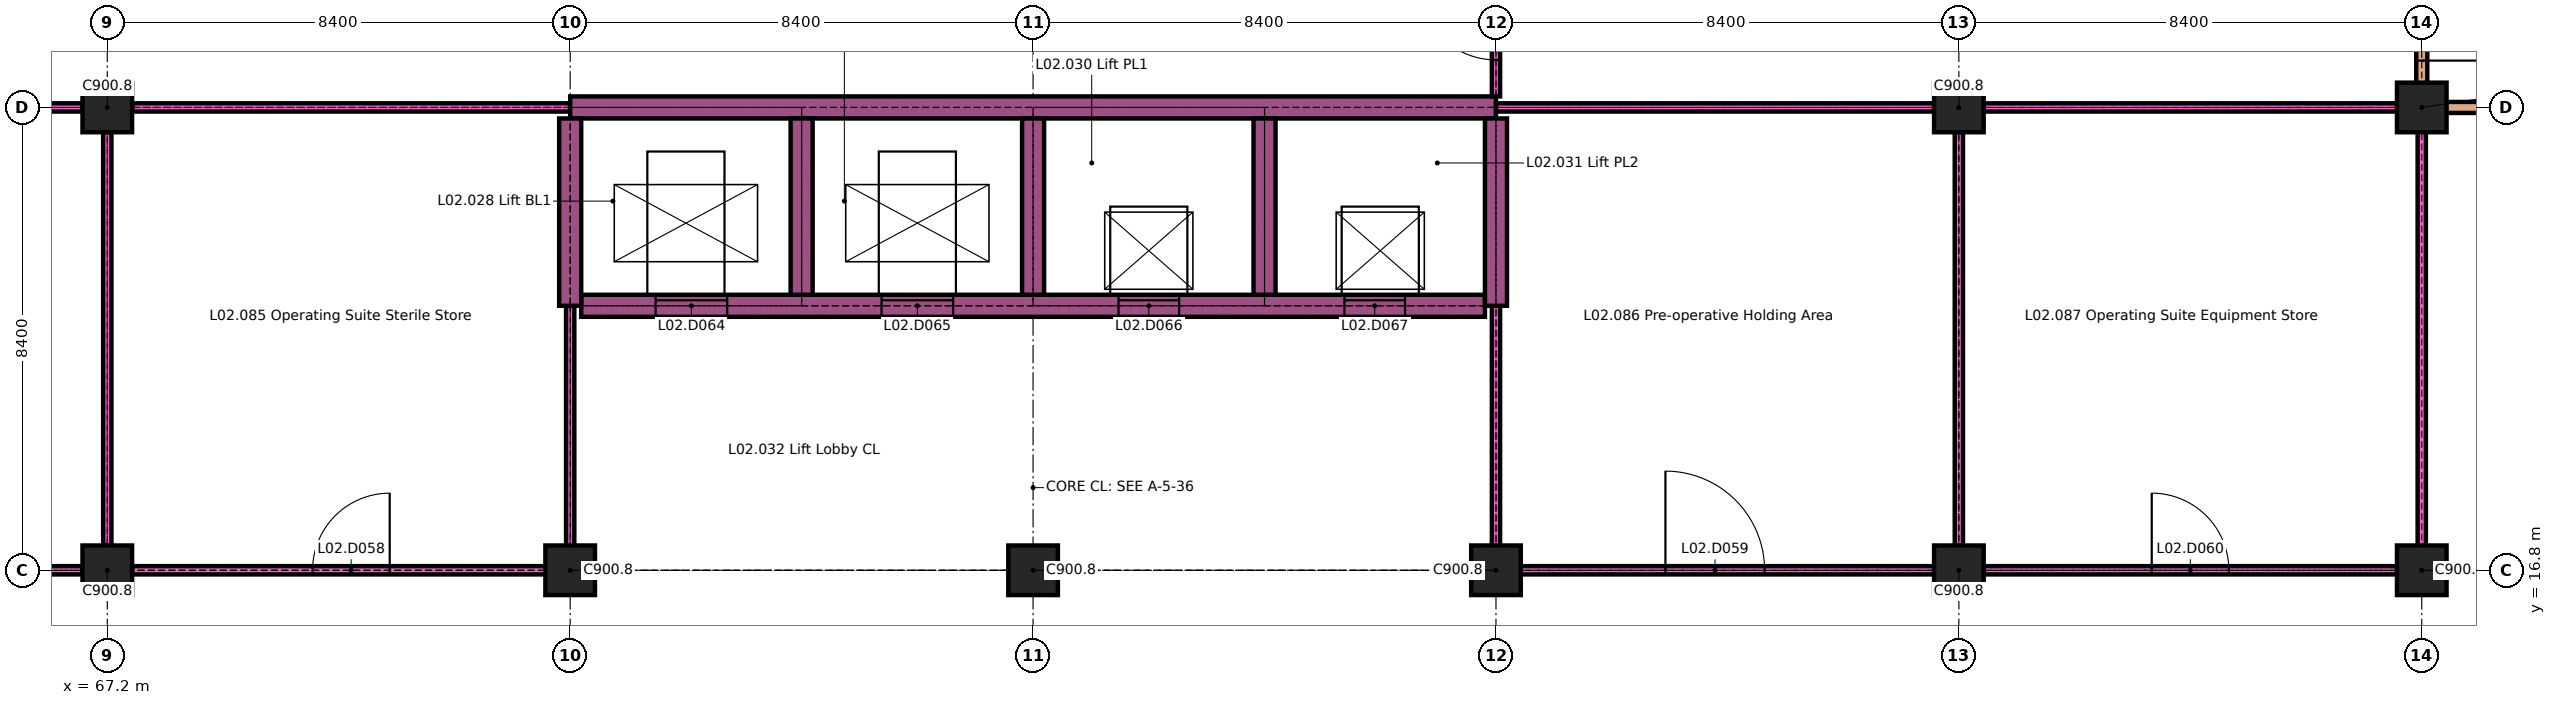
"""IFC4 building model, lengths in metres.
Left out: names, types, materials, properties, quantities, classifications, styles, units other than length and angle.
Written with IfcOpenShell. Run it as: python <this file> out.ifc"""

import sys

from ifc_helpers import new_model, si_unit, direction, frame, frame_2d, origin, origin_2d, place, context, subcontext, project, spatial, rectangle, extrude, element, fill, save


model = new_model("IFC4")
c1 = context("Model", 3, precision=1e-05, world=origin(), true_north=direction((0.0, 1.0)))
c2 = subcontext(c1, "Body", "Model", "MODEL_VIEW")
j1 = project(units=[si_unit("LENGTHUNIT", "METRE"), si_unit("PLANEANGLEUNIT", "RADIAN")], contexts=[c1])
p1 = place(None, origin())
s1 = spatial("IfcSite", under=j1, at=p1, CompositionType="ELEMENT")
p2 = place(p1, origin())
s2 = spatial("IfcBuilding", under=s1, at=p2, CompositionType="ELEMENT")
p3 = place(p2, frame((0.0, 0.0, 8.4)))
s3 = spatial("IfcBuildingStorey", under=s2, at=p3, CompositionType="ELEMENT", Elevation=8.4)
for number, where, z_axis, x_axis in (
    (1, (67.2, 16.8, 0.0), (0.0, 0.0, 1.0), (1.0, 0.0, 0.0)),
    (2, (100.8, 16.8, 0.0), (0.0, 0.0, 1.0), (1.0, 0.0, 0.0)),
    (3, (109.2, 16.8, 0.0), (0.0, 0.0, 1.0), (1.0, 0.0, 0.0)),
    (4, (67.2, 25.2, 0.0), (0.0, 0.0, 1.0), (1.0, 0.0, 0.0)),
    (5, (100.8, 25.2, 0.0), (0.0, 0.0, 1.0), (1.0, 0.0, 0.0)),
):
    element("IfcColumn", number, at=place(p3, frame(where, z_axis=z_axis, x_axis=x_axis)), inside=s3, PredefinedType="COLUMN", context=c2, shape_type="SweptSolid", body=[
        extrude(rectangle(XDim=0.9, YDim=0.9, at=origin_2d()), origin(), (0.0, 0.0, 1.0), 4.2),
    ])
p4 = place(p3, frame((59.25, 16.8, 0.0), z_axis=(0.0, 0.0, 1.0), x_axis=(1.0, 0.0, 0.0)))
e6 = element("IfcWall", 6, at=p4, inside=s3, PredefinedType="PARTITIONING", context=c2, shape_type="SweptSolid", body=[
    extrude(rectangle(XDim=7.5, YDim=0.15, at=frame_2d((3.75, 0.0))), origin(), (0.0, 0.0, 1.0), 4.2),
])
p5 = place(p4, frame((2.85, 0.0, 0.0)))
e7 = element("IfcOpeningElement", 7, at=p5, cuts=e6, PredefinedType="OPENING", context=c2, shape_type="SweptSolid", body=[
    extrude(rectangle(XDim=1.8, YDim=2.4, at=frame_2d((0.9, 1.2))), frame((0.0, 0.085, 0.0), z_axis=(0.0, -1.0, 0.0), x_axis=(1.0, 0.0, 0.0)), (0.0, 0.0, 1.0), 0.17),
])
p6 = place(p3, frame((67.65, 16.8, 0.0), z_axis=(0.0, 0.0, 1.0), x_axis=(1.0, 0.0, 0.0)))
e8 = element("IfcWall", 8, at=p6, inside=s3, PredefinedType="PARTITIONING", context=c2, shape_type="SweptSolid", body=[
    extrude(rectangle(XDim=8.025, YDim=0.15, at=frame_2d((4.013, 0.0))), origin(), (0.0, 0.0, 1.0), 4.2),
])
p7 = place(p6, frame((3.275, 0.0, 0.0)))
e9 = element("IfcOpeningElement", 9, at=p7, cuts=e8, PredefinedType="OPENING", context=c2, shape_type="SweptSolid", body=[
    extrude(rectangle(XDim=1.4, YDim=2.1, at=frame_2d((0.7, 1.05))), frame((0.0, 0.085, 0.0), z_axis=(0.0, -1.0, 0.0), x_axis=(1.0, 0.0, 0.0)), (0.0, 0.0, 1.0), 0.17),
])
p8 = place(p3, frame((92.325, 16.8, 0.0), z_axis=(0.0, 0.0, 1.0), x_axis=(1.0, 0.0, 0.0)))
e10 = element("IfcWall", 10, at=p8, inside=s3, PredefinedType="PARTITIONING", context=c2, shape_type="SweptSolid", body=[
    extrude(rectangle(XDim=8.025, YDim=0.15, at=frame_2d((4.013, 0.0))), origin(), (0.0, 0.0, 1.0), 4.2),
])
p9 = place(p8, frame((3.15, 0.0, 0.0)))
e11 = element("IfcOpeningElement", 11, at=p9, cuts=e10, PredefinedType="OPENING", context=c2, shape_type="SweptSolid", body=[
    extrude(rectangle(XDim=1.8, YDim=2.4, at=frame_2d((0.9, 1.2))), frame((0.0, 0.085, 0.0), z_axis=(0.0, -1.0, 0.0), x_axis=(1.0, 0.0, 0.0)), (0.0, 0.0, 1.0), 0.17),
])
p10 = place(p3, frame((101.25, 16.8, 0.0), z_axis=(0.0, 0.0, 1.0), x_axis=(1.0, 0.0, 0.0)))
e12 = element("IfcWall", 12, at=p10, inside=s3, PredefinedType="PARTITIONING", context=c2, shape_type="SweptSolid", body=[
    extrude(rectangle(XDim=7.5, YDim=0.15, at=frame_2d((3.75, 0.0))), origin(), (0.0, 0.0, 1.0), 4.2),
])
p11 = place(p10, frame((3.05, 0.0, 0.0)))
e13 = element("IfcOpeningElement", 13, at=p11, cuts=e12, PredefinedType="OPENING", context=c2, shape_type="SweptSolid", body=[
    extrude(rectangle(XDim=1.4, YDim=2.1, at=frame_2d((0.7, 1.05))), frame((0.0, 0.085, 0.0), z_axis=(0.0, -1.0, 0.0), x_axis=(1.0, 0.0, 0.0)), (0.0, 0.0, 1.0), 0.17),
])
p12 = place(p3, frame((75.8, 21.6, 0.0), z_axis=(0.0, 0.0, 1.0), x_axis=(1.0, 0.0, 0.0)))
e14 = element("IfcWall", 14, at=p12, inside=s3, PredefinedType="SHEAR", context=c2, shape_type="SweptSolid", body=[
    extrude(rectangle(XDim=16.4, YDim=0.4, at=frame_2d((8.2, 0.0))), origin(), (0.0, 0.0, 1.0), 4.2),
])
p13 = place(p12, frame((1.35, 0.0, 0.0)))
e15 = element("IfcOpeningElement", 15, at=p13, cuts=e14, PredefinedType="OPENING", context=c2, shape_type="SweptSolid", body=[
    extrude(rectangle(XDim=1.3, YDim=2.1, at=frame_2d((0.65, 1.05))), frame((0.0, 0.21, 0.0), z_axis=(0.0, -1.0, 0.0), x_axis=(1.0, 0.0, 0.0)), (0.0, 0.0, 1.0), 0.42),
])
p14 = place(p12, frame((5.45, 0.0, 0.0)))
e16 = element("IfcOpeningElement", 16, at=p14, cuts=e14, PredefinedType="OPENING", context=c2, shape_type="SweptSolid", body=[
    extrude(rectangle(XDim=1.3, YDim=2.1, at=frame_2d((0.65, 1.05))), frame((0.0, 0.21, 0.0), z_axis=(0.0, -1.0, 0.0), x_axis=(1.0, 0.0, 0.0)), (0.0, 0.0, 1.0), 0.42),
])
p15 = place(p12, frame((9.75, 0.0, 0.0)))
e17 = element("IfcOpeningElement", 17, at=p15, cuts=e14, PredefinedType="OPENING", context=c2, shape_type="SweptSolid", body=[
    extrude(rectangle(XDim=1.1, YDim=2.1, at=frame_2d((0.55, 1.05))), frame((0.0, 0.21, 0.0), z_axis=(0.0, -1.0, 0.0), x_axis=(1.0, 0.0, 0.0)), (0.0, 0.0, 1.0), 0.42),
])
p16 = place(p12, frame((13.85, 0.0, 0.0)))
e18 = element("IfcOpeningElement", 18, at=p16, cuts=e14, PredefinedType="OPENING", context=c2, shape_type="SweptSolid", body=[
    extrude(rectangle(XDim=1.1, YDim=2.1, at=frame_2d((0.55, 1.05))), frame((0.0, 0.21, 0.0), z_axis=(0.0, -1.0, 0.0), x_axis=(1.0, 0.0, 0.0)), (0.0, 0.0, 1.0), 0.42),
])
p17 = place(p3, frame((59.25, 25.2, 0.0), z_axis=(0.0, 0.0, 1.0), x_axis=(1.0, 0.0, 0.0)))
e19 = element("IfcWall", 19, at=p17, inside=s3, PredefinedType="PARTITIONING", context=c2, shape_type="SweptSolid", body=[
    extrude(rectangle(XDim=7.5, YDim=0.15, at=frame_2d((3.75, 0.0))), origin(), (0.0, 0.0, 1.0), 4.2),
])
p18 = place(p3, frame((67.65, 25.2, 0.0), z_axis=(0.0, 0.0, 1.0), x_axis=(1.0, 0.0, 0.0)))
e20 = element("IfcWall", 20, at=p18, inside=s3, PredefinedType="PARTITIONING", context=c2, shape_type="SweptSolid", body=[
    extrude(rectangle(XDim=7.95, YDim=0.15, at=frame_2d((3.975, 0.0))), origin(), (0.0, 0.0, 1.0), 4.2),
])
p19 = place(p3, frame((75.6, 25.2, 0.0), z_axis=(0.0, 0.0, 1.0), x_axis=(1.0, 0.0, 0.0)))
e21 = element("IfcWall", 21, at=p19, inside=s3, PredefinedType="SHEAR", context=c2, shape_type="SweptSolid", body=[
    extrude(rectangle(XDim=16.8, YDim=0.4, at=frame_2d((8.4, 0.0))), origin(), (0.0, 0.0, 1.0), 4.2),
])
p20 = place(p3, frame((92.4, 25.2, 0.0), z_axis=(0.0, 0.0, 1.0), x_axis=(1.0, 0.0, 0.0)))
e22 = element("IfcWall", 22, at=p20, inside=s3, PredefinedType="PARTITIONING", context=c2, shape_type="SweptSolid", body=[
    extrude(rectangle(XDim=7.95, YDim=0.15, at=frame_2d((3.975, 0.0))), origin(), (0.0, 0.0, 1.0), 4.2),
])
p21 = place(p3, frame((101.25, 25.2, 0.0), z_axis=(0.0, 0.0, 1.0), x_axis=(1.0, 0.0, 0.0)))
e23 = element("IfcWall", 23, at=p21, inside=s3, PredefinedType="PARTITIONING", context=c2, shape_type="SweptSolid", body=[
    extrude(rectangle(XDim=7.95, YDim=0.15, at=frame_2d((3.975, 0.0))), origin(), (0.0, 0.0, 1.0), 4.2),
])
p22 = place(p3, frame((109.2, 25.2, 0.0), z_axis=(0.0, 0.0, 1.0), x_axis=(1.0, 0.0, 0.0)))
e24 = element("IfcWall", 24, at=p22, inside=s3, PredefinedType="PARTITIONING", context=c2, shape_type="SweptSolid", body=[
    extrude(rectangle(XDim=8.4, YDim=0.2, at=frame_2d((4.2, 0.0))), origin(), (0.0, 0.0, 1.0), 4.2),
])
p23 = place(p22, frame((3.5, 0.0, 0.0)))
e25 = element("IfcOpeningElement", 25, at=p23, cuts=e24, PredefinedType="OPENING", context=c2, shape_type="SweptSolid", body=[
    extrude(rectangle(XDim=1.4, YDim=2.1, at=frame_2d((0.7, 1.05))), frame((0.0, 0.11, 0.0), z_axis=(0.0, -1.0, 0.0), x_axis=(1.0, 0.0, 0.0)), (0.0, 0.0, 1.0), 0.22),
])
p24 = place(p3, frame((67.2, 17.25, 0.0), z_axis=(0.0, 0.0, 1.0), x_axis=(0.0, 1.0, 0.0)))
e26 = element("IfcWall", 26, at=p24, inside=s3, PredefinedType="PARTITIONING", context=c2, shape_type="SweptSolid", body=[
    extrude(rectangle(XDim=7.5, YDim=0.15, at=frame_2d((3.75, 0.0))), origin(), (0.0, 0.0, 1.0), 4.2),
])
p25 = place(p3, frame((75.6, 16.875, 0.0), z_axis=(0.0, 0.0, 1.0), x_axis=(0.0, 1.0, 0.0)))
e27 = element("IfcWall", 27, at=p25, inside=s3, PredefinedType="PARTITIONING", context=c2, shape_type="SweptSolid", body=[
    extrude(rectangle(XDim=4.725, YDim=0.15, at=frame_2d((2.363, 0.0))), origin(), (0.0, 0.0, 1.0), 4.2),
])
p26 = place(p3, frame((75.6, 21.6, 0.0), z_axis=(0.0, 0.0, 1.0), x_axis=(0.0, 1.0, 0.0)))
e28 = element("IfcWall", 28, at=p26, inside=s3, PredefinedType="SHEAR", context=c2, shape_type="SweptSolid", body=[
    extrude(rectangle(XDim=3.4, YDim=0.4, at=frame_2d((1.7, 0.0))), origin(), (0.0, 0.0, 1.0), 4.2),
])
for number, where, z_axis, x_axis in (
    (29, (79.8, 21.8, 0.0), (0.0, 0.0, 1.0), (0.0, 1.0, 0.0)),
    (30, (84.0, 21.8, 0.0), (0.0, 0.0, 1.0), (0.0, 1.0, 0.0)),
    (31, (88.2, 21.8, 0.0), (0.0, 0.0, 1.0), (0.0, 1.0, 0.0)),
):
    element("IfcWall", number, at=place(p3, frame(where, z_axis=z_axis, x_axis=x_axis)), inside=s3, PredefinedType="SHEAR", context=c2, shape_type="SweptSolid", body=[
        extrude(rectangle(XDim=3.2, YDim=0.4, at=frame_2d((1.6, 0.0))), origin(), (0.0, 0.0, 1.0), 4.2),
    ])
p27 = place(p3, frame((92.4, 16.875, 0.0), z_axis=(0.0, 0.0, 1.0), x_axis=(0.0, 1.0, 0.0)))
e32 = element("IfcWall", 32, at=p27, inside=s3, PredefinedType="PARTITIONING", context=c2, shape_type="SweptSolid", body=[
    extrude(rectangle(XDim=4.725, YDim=0.15, at=frame_2d((2.363, 0.0))), origin(), (0.0, 0.0, 1.0), 4.2),
])
p28 = place(p3, frame((92.4, 21.6, 0.0), z_axis=(0.0, 0.0, 1.0), x_axis=(0.0, 1.0, 0.0)))
e33 = element("IfcWall", 33, at=p28, inside=s3, PredefinedType="SHEAR", context=c2, shape_type="SweptSolid", body=[
    extrude(rectangle(XDim=3.4, YDim=0.4, at=frame_2d((1.7, 0.0))), origin(), (0.0, 0.0, 1.0), 4.2),
])
p29 = place(p3, frame((92.4, 25.4, 0.0), z_axis=(0.0, 0.0, 1.0), x_axis=(0.0, 1.0, 0.0)))
e34 = element("IfcWall", 34, at=p29, inside=s3, PredefinedType="PARTITIONING", context=c2, shape_type="SweptSolid", body=[
    extrude(rectangle(XDim=2.725, YDim=0.15, at=frame_2d((1.363, 0.0))), origin(), (0.0, 0.0, 1.0), 4.2),
])
p30 = place(p29, frame((0.663, 0.0, 0.0)))
e35 = element("IfcOpeningElement", 35, at=p30, cuts=e34, PredefinedType="OPENING", context=c2, shape_type="SweptSolid", body=[
    extrude(rectangle(XDim=1.4, YDim=2.1, at=frame_2d((0.7, 1.05))), frame((0.0, 0.085, 0.0), z_axis=(0.0, -1.0, 0.0), x_axis=(1.0, 0.0, 0.0)), (0.0, 0.0, 1.0), 0.17),
])
p31 = place(p3, frame((100.8, 17.25, 0.0), z_axis=(0.0, 0.0, 1.0), x_axis=(0.0, 1.0, 0.0)))
e36 = element("IfcWall", 36, at=p31, inside=s3, PredefinedType="PARTITIONING", context=c2, shape_type="SweptSolid", body=[
    extrude(rectangle(XDim=7.5, YDim=0.15, at=frame_2d((3.75, 0.0))), origin(), (0.0, 0.0, 1.0), 4.2),
])
p32 = place(p3, frame((109.2, 17.25, 0.0), z_axis=(0.0, 0.0, 1.0), x_axis=(0.0, 1.0, 0.0)))
e37 = element("IfcWall", 37, at=p32, inside=s3, PredefinedType="PARTITIONING", context=c2, shape_type="SweptSolid", body=[
    extrude(rectangle(XDim=7.85, YDim=0.15, at=frame_2d((3.925, 0.0))), origin(), (0.0, 0.0, 1.0), 4.2),
])
p33 = place(p3, frame((109.2, 25.3, 0.0), z_axis=(0.0, 0.0, 1.0), x_axis=(0.0, 1.0, 0.0)))
e38 = element("IfcWall", 38, at=p33, inside=s3, PredefinedType="PARTITIONING", context=c2, shape_type="SweptSolid", body=[
    extrude(rectangle(XDim=4.7, YDim=0.2, at=frame_2d((2.35, 0.0))), origin(), (0.0, 0.0, 1.0), 4.2),
])
p34 = place(p33, frame((0.75, 0.0, 0.0)))
e39 = element("IfcOpeningElement", 39, at=p34, cuts=e38, PredefinedType="OPENING", context=c2, shape_type="SweptSolid", body=[
    extrude(rectangle(XDim=1.4, YDim=2.1, at=frame_2d((0.7, 1.05))), frame((0.0, 0.11, 0.0), z_axis=(0.0, -1.0, 0.0), x_axis=(1.0, 0.0, 0.0)), (0.0, 0.0, 1.0), 0.22),
])
for number, where, z_axis, x_axis in (
    (40, (75.6, 16.8, 0.0), (0.0, 0.0, 1.0), (1.0, 0.0, 0.0)),
    (41, (84.0, 16.8, 0.0), (0.0, 0.0, 1.0), (1.0, 0.0, 0.0)),
    (42, (92.4, 16.8, 0.0), (0.0, 0.0, 1.0), (1.0, 0.0, 0.0)),
    (43, (109.2, 25.2, 0.0), (0.0, 0.0, 1.0), (1.0, 0.0, 0.0)),
):
    element("IfcColumn", number, at=place(p3, frame(where, z_axis=z_axis, x_axis=x_axis)), inside=s3, PredefinedType="COLUMN", context=c2, shape_type="SweptSolid", body=[
        extrude(rectangle(XDim=0.9, YDim=0.9, at=origin_2d()), origin(), (0.0, 0.0, 1.0), 4.2),
    ])
p35 = place(p7, origin())
e44 = element("IfcDoor", 44, at=p35, inside=s3, OperationType="SINGLE_SWING_LEFT", PredefinedType="DOOR", context=c2, shape_type="SweptSolid", body=[
    extrude(rectangle(XDim=1.4, YDim=2.1, at=frame_2d((0.7, 1.05))), frame((0.0, 0.025, 0.0), z_axis=(0.0, -1.0, 0.0), x_axis=(1.0, 0.0, 0.0)), (0.0, 0.0, 1.0), 0.05),
])
fill(e9, e44)
p36 = place(p9, origin())
e45 = element("IfcDoor", 45, at=p36, inside=s3, OperationType="SINGLE_SWING_RIGHT", PredefinedType="DOOR", context=c2, shape_type="SweptSolid", body=[
    extrude(rectangle(XDim=1.8, YDim=2.4, at=frame_2d((0.9, 1.2))), frame((0.0, 0.03, 0.0), z_axis=(0.0, -1.0, 0.0), x_axis=(1.0, 0.0, 0.0)), (0.0, 0.0, 1.0), 0.06),
])
fill(e11, e45)
p37 = place(p11, origin())
e46 = element("IfcDoor", 46, at=p37, inside=s3, OperationType="SINGLE_SWING_RIGHT", PredefinedType="DOOR", context=c2, shape_type="SweptSolid", body=[
    extrude(rectangle(XDim=1.4, YDim=2.1, at=frame_2d((0.7, 1.05))), frame((0.0, 0.025, 0.0), z_axis=(0.0, -1.0, 0.0), x_axis=(1.0, 0.0, 0.0)), (0.0, 0.0, 1.0), 0.05),
])
fill(e13, e46)
p38 = place(p13, origin())
e47 = element("IfcDoor", 47, at=p38, inside=s3, OperationType="SLIDING_TO_LEFT", PredefinedType="DOOR", context=c2, shape_type="SweptSolid", body=[
    extrude(rectangle(XDim=1.3, YDim=2.1, at=frame_2d((0.65, 1.05))), frame((0.0, 0.025, 0.0), z_axis=(0.0, -1.0, 0.0), x_axis=(1.0, 0.0, 0.0)), (0.0, 0.0, 1.0), 0.05),
])
fill(e15, e47)
p39 = place(p14, origin())
e48 = element("IfcDoor", 48, at=p39, inside=s3, OperationType="SLIDING_TO_LEFT", PredefinedType="DOOR", context=c2, shape_type="SweptSolid", body=[
    extrude(rectangle(XDim=1.3, YDim=2.1, at=frame_2d((0.65, 1.05))), frame((0.0, 0.025, 0.0), z_axis=(0.0, -1.0, 0.0), x_axis=(1.0, 0.0, 0.0)), (0.0, 0.0, 1.0), 0.05),
])
fill(e16, e48)
p40 = place(p15, origin())
e49 = element("IfcDoor", 49, at=p40, inside=s3, OperationType="SLIDING_TO_LEFT", PredefinedType="DOOR", context=c2, shape_type="SweptSolid", body=[
    extrude(rectangle(XDim=1.1, YDim=2.1, at=frame_2d((0.55, 1.05))), frame((0.0, 0.025, 0.0), z_axis=(0.0, -1.0, 0.0), x_axis=(1.0, 0.0, 0.0)), (0.0, 0.0, 1.0), 0.05),
])
fill(e17, e49)
p41 = place(p16, origin())
e50 = element("IfcDoor", 50, at=p41, inside=s3, OperationType="SLIDING_TO_LEFT", PredefinedType="DOOR", context=c2, shape_type="SweptSolid", body=[
    extrude(rectangle(XDim=1.1, YDim=2.1, at=frame_2d((0.55, 1.05))), frame((0.0, 0.025, 0.0), z_axis=(0.0, -1.0, 0.0), x_axis=(1.0, 0.0, 0.0)), (0.0, 0.0, 1.0), 0.05),
])
fill(e18, e50)
p42 = place(p30, origin())
e51 = element("IfcDoor", 51, at=p42, inside=s3, OperationType="SINGLE_SWING_LEFT", PredefinedType="DOOR", context=c2, shape_type="SweptSolid", body=[
    extrude(rectangle(XDim=1.4, YDim=2.1, at=frame_2d((0.7, 1.05))), frame((0.0, 0.025, 0.0), z_axis=(0.0, -1.0, 0.0), x_axis=(1.0, 0.0, 0.0)), (0.0, 0.0, 1.0), 0.05),
])
fill(e35, e51)
p43 = place(p34, origin())
e52 = element("IfcDoor", 52, at=p43, inside=s3, OperationType="SINGLE_SWING_LEFT", PredefinedType="DOOR", context=c2, shape_type="SweptSolid", body=[
    extrude(rectangle(XDim=1.4, YDim=2.1, at=frame_2d((0.7, 1.05))), frame((0.0, 0.03, 0.0), z_axis=(0.0, -1.0, 0.0), x_axis=(1.0, 0.0, 0.0)), (0.0, 0.0, 1.0), 0.06),
])
fill(e39, e52)
save(model, sys.argv[1])
